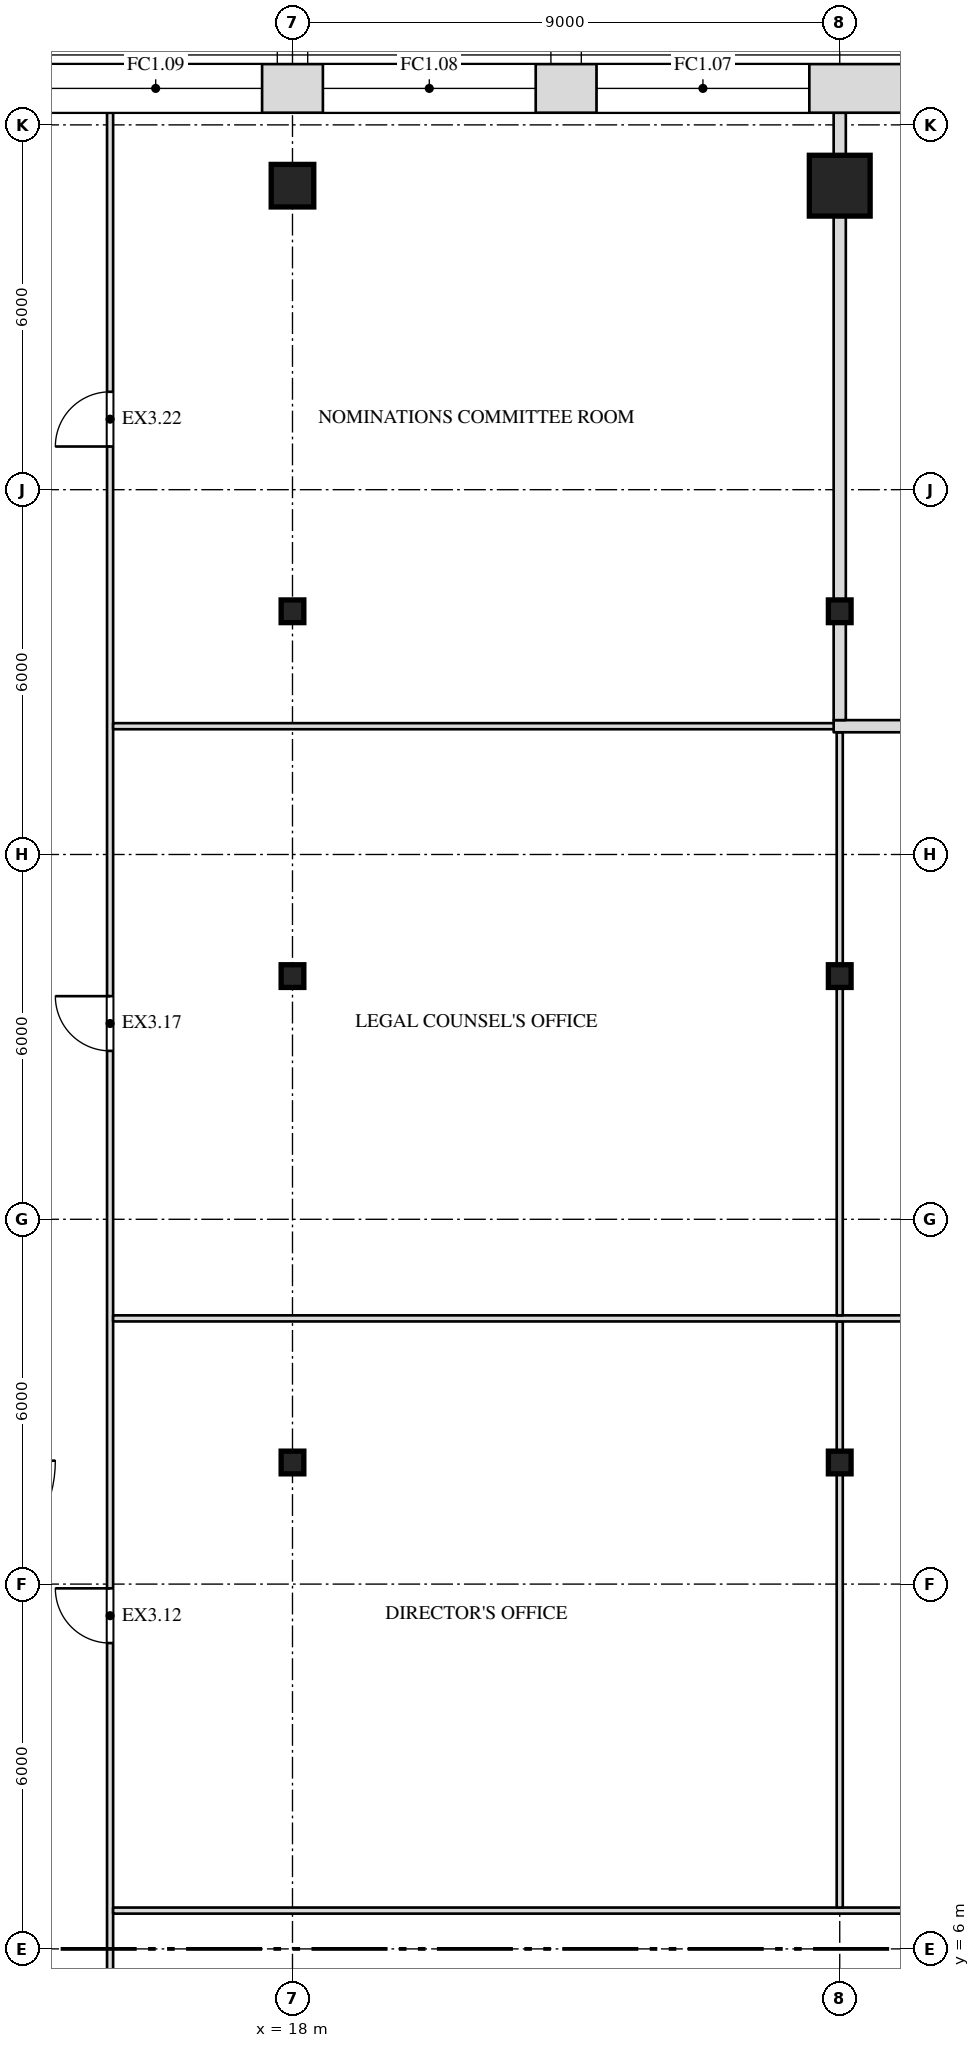
"""IFC4 building model, lengths in metres.
Left out: names, types, materials, properties, quantities, classifications, styles, units other than length and angle.
Written with IfcOpenShell. Run it as: python <this file> out.ifc"""

import sys

from ifc_helpers import new_model, si_unit, direction, frame, frame_2d, origin, origin_2d, place, context, subcontext, project, spatial, rectangle, i_section, extrude, element, fill, save


model = new_model("IFC4")
c1 = context("Model", 3, precision=1e-05, world=origin(), true_north=direction((0.0, 1.0)))
c2 = subcontext(c1, "Body", "Model", "MODEL_VIEW")
j1 = project(units=[si_unit("LENGTHUNIT", "METRE"), si_unit("PLANEANGLEUNIT", "RADIAN")], contexts=[c1])
p1 = place(None, origin())
s1 = spatial("IfcSite", under=j1, at=p1, CompositionType="ELEMENT")
p2 = place(p1, origin())
s2 = spatial("IfcBuilding", under=s1, at=p2, CompositionType="ELEMENT")
p3 = place(p2, frame((0.0, 0.0, 280.5)))
s3 = spatial("IfcBuildingStorey", under=s2, at=p3, CompositionType="ELEMENT", Elevation=280.5)
for number, where, z_axis, x_axis in (
    (1, (18.0, 14.0, 0.0), (0.0, 0.0, 1.0), (1.0, 0.0, 0.0)),
    (2, (27.0, 14.0, 0.0), (0.0, 0.0, 1.0), (1.0, 0.0, 0.0)),
    (3, (18.0, 22.0, 0.0), (0.0, 0.0, 1.0), (1.0, 0.0, 0.0)),
    (4, (27.0, 22.0, 0.0), (0.0, 0.0, 1.0), (1.0, 0.0, 0.0)),
    (5, (18.0, 28.0, 0.0), (0.0, 0.0, 1.0), (1.0, 0.0, 0.0)),
    (6, (27.0, 28.0, 0.0), (0.0, 0.0, 1.0), (1.0, 0.0, 0.0)),
):
    element("IfcColumn", number, at=place(p3, frame(where, z_axis=z_axis, x_axis=x_axis)), inside=s3, PredefinedType="COLUMN", context=c2, shape_type="SweptSolid", body=[
        extrude(i_section(OverallWidth=0.373, OverallDepth=0.373, WebThickness=0.016, FlangeThickness=0.026, at=origin_2d()), origin(), (0.0, 0.0, 1.0), 4.0),
    ])
p4 = place(p3, frame((18.0, 35.0, 0.0), z_axis=(0.0, 0.0, 1.0), x_axis=(1.0, 0.0, 0.0)))
e7 = element("IfcColumn", 7, at=p4, inside=s3, PredefinedType="COLUMN", context=c2, shape_type="SweptSolid", body=[
    extrude(rectangle(XDim=0.7, YDim=0.7, at=origin_2d()), origin(), (0.0, 0.0, 1.0), 4.0),
])
p5 = place(p3, frame((27.0, 35.0, 0.0), z_axis=(0.0, 0.0, 1.0), x_axis=(1.0, 0.0, 0.0)))
e8 = element("IfcColumn", 8, at=p5, inside=s3, PredefinedType="COLUMN", context=c2, shape_type="SweptSolid", body=[
    extrude(rectangle(XDim=1.0, YDim=1.0, at=origin_2d()), origin(), (0.0, 0.0, 1.0), 4.0),
])
p6 = place(p3, frame((15.0, -2.0, 0.0), z_axis=(0.0, 0.0, 1.0), x_axis=(0.0, 1.0, 0.0)))
e9 = element("IfcWall", 9, at=p6, inside=s3, PredefinedType="PARTITIONING", context=c2, shape_type="SweptSolid", body=[
    extrude(rectangle(XDim=38.2, YDim=0.1, at=frame_2d((19.1, 0.0))), origin(), (0.0, 0.0, 1.0), 3.78),
])
p7 = place(p6, frame((13.03, 0.0, 0.0)))
e10 = element("IfcOpeningElement", 10, at=p7, cuts=e9, PredefinedType="OPENING", context=c2, shape_type="SweptSolid", body=[
    extrude(rectangle(XDim=0.9, YDim=2.1, at=frame_2d((0.45, 1.05))), frame((0.0, 0.062, 0.0), z_axis=(0.0, -1.0, 0.0), x_axis=(1.0, 0.0, 0.0)), (0.0, 0.0, 1.0), 0.124),
])
p8 = place(p6, frame((22.77, 0.0, 0.0)))
e11 = element("IfcOpeningElement", 11, at=p8, cuts=e9, PredefinedType="OPENING", context=c2, shape_type="SweptSolid", body=[
    extrude(rectangle(XDim=0.9, YDim=2.1, at=frame_2d((0.45, 1.05))), frame((0.0, 0.062, 0.0), z_axis=(0.0, -1.0, 0.0), x_axis=(1.0, 0.0, 0.0)), (0.0, 0.0, 1.0), 0.124),
])
p9 = place(p6, frame((32.71, 0.0, 0.0)))
e12 = element("IfcOpeningElement", 12, at=p9, cuts=e9, PredefinedType="OPENING", context=c2, shape_type="SweptSolid", body=[
    extrude(rectangle(XDim=0.9, YDim=2.1, at=frame_2d((0.45, 1.05))), frame((0.0, 0.062, 0.0), z_axis=(0.0, -1.0, 0.0), x_axis=(1.0, 0.0, 0.0)), (0.0, 0.0, 1.0), 0.124),
])
p10 = place(p3, frame((15.05, 6.63, 0.0), z_axis=(0.0, 0.0, 1.0), x_axis=(1.0, 0.0, 0.0)))
e13 = element("IfcWall", 13, at=p10, inside=s3, PredefinedType="PARTITIONING", context=c2, shape_type="SweptSolid", body=[
    extrude(rectangle(XDim=20.15, YDim=0.1, at=frame_2d((10.075, 0.0))), origin(), (0.0, 0.0, 1.0), 3.78),
])
p11 = place(p10, frame((15.6, 0.0, 0.0)))
e14 = element("IfcOpeningElement", 14, at=p11, cuts=e13, PredefinedType="OPENING", context=c2, shape_type="SweptSolid", body=[
    extrude(rectangle(XDim=0.9, YDim=2.1, at=frame_2d((0.45, 1.05))), frame((0.0, 0.062, 0.0), z_axis=(0.0, -1.0, 0.0), x_axis=(1.0, 0.0, 0.0)), (0.0, 0.0, 1.0), 0.124),
])
p12 = place(p3, frame((27.0, 6.68, 0.0), z_axis=(0.0, 0.0, 1.0), x_axis=(0.0, 1.0, 0.0)))
e15 = element("IfcWall", 15, at=p12, inside=s3, PredefinedType="PARTITIONING", context=c2, shape_type="SweptSolid", body=[
    extrude(rectangle(XDim=7.133, YDim=0.1, at=frame_2d((3.567, 0.0))), origin(), (0.0, 0.0, 1.0), 2.848),
])
p13 = place(p3, frame((27.0, 14.187, 0.0), z_axis=(0.0, 0.0, 1.0), x_axis=(0.0, 1.0, 0.0)))
e16 = element("IfcWall", 16, at=p13, inside=s3, PredefinedType="PARTITIONING", context=c2, shape_type="SweptSolid", body=[
    extrude(rectangle(XDim=2.133, YDim=0.1, at=frame_2d((1.067, 0.0))), origin(), (0.0, 0.0, 1.0), 2.848),
])
p14 = place(p3, frame((15.05, 16.37, 0.0), z_axis=(0.0, 0.0, 1.0), x_axis=(1.0, 0.0, 0.0)))
e17 = element("IfcWall", 17, at=p14, inside=s3, PredefinedType="PARTITIONING", context=c2, shape_type="SweptSolid", body=[
    extrude(rectangle(XDim=20.15, YDim=0.1, at=frame_2d((10.075, 0.0))), origin(), (0.0, 0.0, 1.0), 3.78),
])
p15 = place(p14, frame((15.6, 0.0, 0.0)))
e18 = element("IfcOpeningElement", 18, at=p15, cuts=e17, PredefinedType="OPENING", context=c2, shape_type="SweptSolid", body=[
    extrude(rectangle(XDim=0.9, YDim=2.1, at=frame_2d((0.45, 1.05))), frame((0.0, 0.062, 0.0), z_axis=(0.0, -1.0, 0.0), x_axis=(1.0, 0.0, 0.0)), (0.0, 0.0, 1.0), 0.124),
])
p16 = place(p3, frame((27.0, 16.42, 0.0), z_axis=(0.0, 0.0, 1.0), x_axis=(0.0, 1.0, 0.0)))
e19 = element("IfcWall", 19, at=p16, inside=s3, PredefinedType="PARTITIONING", context=c2, shape_type="SweptSolid", body=[
    extrude(rectangle(XDim=5.393, YDim=0.1, at=frame_2d((2.697, 0.0))), origin(), (0.0, 0.0, 1.0), 2.848),
])
p17 = place(p3, frame((27.0, 22.187, 0.0), z_axis=(0.0, 0.0, 1.0), x_axis=(0.0, 1.0, 0.0)))
e20 = element("IfcWall", 20, at=p17, inside=s3, PredefinedType="PARTITIONING", context=c2, shape_type="SweptSolid", body=[
    extrude(rectangle(XDim=3.823, YDim=0.1, at=frame_2d((1.912, 0.0))), origin(), (0.0, 0.0, 1.0), 2.848),
])
p18 = place(p3, frame((15.05, 26.11, 0.0), z_axis=(0.0, 0.0, 1.0), x_axis=(1.0, 0.0, 0.0)))
e21 = element("IfcWall", 21, at=p18, inside=s3, PredefinedType="PARTITIONING", context=c2, shape_type="SweptSolid", body=[
    extrude(rectangle(XDim=12.05, YDim=0.1, at=frame_2d((6.025, 0.0))), origin(), (0.0, 0.0, 1.0), 3.78),
])
p19 = place(p3, frame((26.9, 26.11, 0.0), z_axis=(0.0, 0.0, 1.0), x_axis=(1.0, 0.0, 0.0)))
e22 = element("IfcWall", 22, at=p19, inside=s3, PredefinedType="PARTITIONING", context=c2, shape_type="SweptSolid", body=[
    extrude(rectangle(XDim=8.3, YDim=0.2, at=frame_2d((4.15, 0.0))), origin(), (0.0, 0.0, 1.0), 3.78),
])
p20 = place(p19, frame((3.75, 0.0, 0.0)))
e23 = element("IfcOpeningElement", 23, at=p20, cuts=e22, PredefinedType="OPENING", context=c2, shape_type="SweptSolid", body=[
    extrude(rectangle(XDim=0.9, YDim=2.1, at=frame_2d((0.45, 1.05))), frame((0.0, 0.112, 0.0), z_axis=(0.0, -1.0, 0.0), x_axis=(1.0, 0.0, 0.0)), (0.0, 0.0, 1.0), 0.224),
])
p21 = place(p3, frame((27.0, 26.21, 0.0), z_axis=(0.0, 0.0, 1.0), x_axis=(0.0, 1.0, 0.0)))
e24 = element("IfcWall", 24, at=p21, inside=s3, PredefinedType="PARTITIONING", context=c2, shape_type="SweptSolid", body=[
    extrude(rectangle(XDim=1.603, YDim=0.2, at=frame_2d((0.802, 0.0))), origin(), (0.0, 0.0, 1.0), 2.848),
])
p22 = place(p3, frame((27.0, 28.187, 0.0), z_axis=(0.0, 0.0, 1.0), x_axis=(0.0, 1.0, 0.0)))
e25 = element("IfcWall", 25, at=p22, inside=s3, PredefinedType="PARTITIONING", context=c2, shape_type="SweptSolid", body=[
    extrude(rectangle(XDim=6.313, YDim=0.2, at=frame_2d((3.157, 0.0))), origin(), (0.0, 0.0, 1.0), 2.848),
])
p23 = place(p3, frame((27.0, 35.5, 0.0), z_axis=(0.0, 0.0, 1.0), x_axis=(0.0, 1.0, 0.0)))
e26 = element("IfcWall", 26, at=p23, inside=s3, PredefinedType="PARTITIONING", context=c2, shape_type="SweptSolid", body=[
    extrude(rectangle(XDim=0.7, YDim=0.2, at=frame_2d((0.35, 0.0))), origin(), (0.0, 0.0, 1.0), 3.78),
])
p24 = place(p3, frame((29.948, 36.6, 0.0), z_axis=(0.0, 0.0, 1.0), x_axis=(-1.0, 0.0, 0.0)))
e27 = element("IfcWall", 27, at=p24, inside=s3, PredefinedType="SOLIDWALL", context=c2, shape_type="SweptSolid", body=[
    extrude(rectangle(XDim=59.895, YDim=0.8, at=frame_2d((29.948, 0.0))), origin(), (0.0, 0.0, 1.0), 3.78),
])
p25 = place(p24, frame((3.448, 0.0, 1.0)))
e28 = element("IfcOpeningElement", 28, at=p25, cuts=e27, PredefinedType="OPENING", context=c2, shape_type="SweptSolid", body=[
    extrude(rectangle(XDim=3.5, YDim=2.5, at=frame_2d((1.75, 1.25))), frame((0.0, 0.412, 0.0), z_axis=(0.0, -1.0, 0.0), x_axis=(1.0, 0.0, 0.0)), (0.0, 0.0, 1.0), 0.824),
])
p26 = place(p24, frame((7.948, 0.0, 1.0)))
e29 = element("IfcOpeningElement", 29, at=p26, cuts=e27, PredefinedType="OPENING", context=c2, shape_type="SweptSolid", body=[
    extrude(rectangle(XDim=3.5, YDim=2.5, at=frame_2d((1.75, 1.25))), frame((0.0, 0.412, 0.0), z_axis=(0.0, -1.0, 0.0), x_axis=(1.0, 0.0, 0.0)), (0.0, 0.0, 1.0), 0.824),
])
p27 = place(p24, frame((12.448, 0.0, 1.0)))
e30 = element("IfcOpeningElement", 30, at=p27, cuts=e27, PredefinedType="OPENING", context=c2, shape_type="SweptSolid", body=[
    extrude(rectangle(XDim=3.5, YDim=2.5, at=frame_2d((1.75, 1.25))), frame((0.0, 0.412, 0.0), z_axis=(0.0, -1.0, 0.0), x_axis=(1.0, 0.0, 0.0)), (0.0, 0.0, 1.0), 0.824),
])
p28 = place(p24, frame((16.948, 0.0, 1.0)))
e31 = element("IfcOpeningElement", 31, at=p28, cuts=e27, PredefinedType="OPENING", context=c2, shape_type="SweptSolid", body=[
    extrude(rectangle(XDim=3.5, YDim=2.5, at=frame_2d((1.75, 1.25))), frame((0.0, 0.412, 0.0), z_axis=(0.0, -1.0, 0.0), x_axis=(1.0, 0.0, 0.0)), (0.0, 0.0, 1.0), 0.824),
])
p29 = place(p24, frame((21.448, 0.0, 1.0)))
e32 = element("IfcOpeningElement", 32, at=p29, cuts=e27, PredefinedType="OPENING", context=c2, shape_type="SweptSolid", body=[
    extrude(rectangle(XDim=3.5, YDim=2.5, at=frame_2d((1.75, 1.25))), frame((0.0, 0.412, 0.0), z_axis=(0.0, -1.0, 0.0), x_axis=(1.0, 0.0, 0.0)), (0.0, 0.0, 1.0), 0.824),
])
p30 = place(p24, frame((25.948, 0.0, 1.0)))
e33 = element("IfcOpeningElement", 33, at=p30, cuts=e27, PredefinedType="OPENING", context=c2, shape_type="SweptSolid", body=[
    extrude(rectangle(XDim=3.5, YDim=2.5, at=frame_2d((1.75, 1.25))), frame((0.0, 0.412, 0.0), z_axis=(0.0, -1.0, 0.0), x_axis=(1.0, 0.0, 0.0)), (0.0, 0.0, 1.0), 0.824),
])
p31 = place(p24, frame((30.448, 0.0, 1.0)))
e34 = element("IfcOpeningElement", 34, at=p31, cuts=e27, PredefinedType="OPENING", context=c2, shape_type="SweptSolid", body=[
    extrude(rectangle(XDim=3.5, YDim=2.5, at=frame_2d((1.75, 1.25))), frame((0.0, 0.412, 0.0), z_axis=(0.0, -1.0, 0.0), x_axis=(1.0, 0.0, 0.0)), (0.0, 0.0, 1.0), 0.824),
])
p32 = place(p24, frame((34.948, 0.0, 1.0)))
e35 = element("IfcOpeningElement", 35, at=p32, cuts=e27, PredefinedType="OPENING", context=c2, shape_type="SweptSolid", body=[
    extrude(rectangle(XDim=3.5, YDim=2.5, at=frame_2d((1.75, 1.25))), frame((0.0, 0.412, 0.0), z_axis=(0.0, -1.0, 0.0), x_axis=(1.0, 0.0, 0.0)), (0.0, 0.0, 1.0), 0.824),
])
p33 = place(p24, frame((39.448, 0.0, 1.0)))
e36 = element("IfcOpeningElement", 36, at=p33, cuts=e27, PredefinedType="OPENING", context=c2, shape_type="SweptSolid", body=[
    extrude(rectangle(XDim=3.5, YDim=2.5, at=frame_2d((1.75, 1.25))), frame((0.0, 0.412, 0.0), z_axis=(0.0, -1.0, 0.0), x_axis=(1.0, 0.0, 0.0)), (0.0, 0.0, 1.0), 0.824),
])
p34 = place(p24, frame((43.948, 0.0, 1.0)))
e37 = element("IfcOpeningElement", 37, at=p34, cuts=e27, PredefinedType="OPENING", context=c2, shape_type="SweptSolid", body=[
    extrude(rectangle(XDim=3.5, YDim=2.5, at=frame_2d((1.75, 1.25))), frame((0.0, 0.412, 0.0), z_axis=(0.0, -1.0, 0.0), x_axis=(1.0, 0.0, 0.0)), (0.0, 0.0, 1.0), 0.824),
])
p35 = place(p24, frame((48.448, 0.0, 1.0)))
e38 = element("IfcOpeningElement", 38, at=p35, cuts=e27, PredefinedType="OPENING", context=c2, shape_type="SweptSolid", body=[
    extrude(rectangle(XDim=3.5, YDim=2.5, at=frame_2d((1.75, 1.25))), frame((0.0, 0.412, 0.0), z_axis=(0.0, -1.0, 0.0), x_axis=(1.0, 0.0, 0.0)), (0.0, 0.0, 1.0), 0.824),
])
p36 = place(p24, frame((52.948, 0.0, 1.0)))
e39 = element("IfcOpeningElement", 39, at=p36, cuts=e27, PredefinedType="OPENING", context=c2, shape_type="SweptSolid", body=[
    extrude(rectangle(XDim=3.5, YDim=2.5, at=frame_2d((1.75, 1.25))), frame((0.0, 0.412, 0.0), z_axis=(0.0, -1.0, 0.0), x_axis=(1.0, 0.0, 0.0)), (0.0, 0.0, 1.0), 0.824),
])
p37 = place(p7, origin())
e40 = element("IfcDoor", 40, at=p37, inside=s3, OperationType="SINGLE_SWING_RIGHT", PredefinedType="DOOR", context=c2, shape_type="SweptSolid", body=[
    extrude(rectangle(XDim=0.9, YDim=2.1, at=frame_2d((0.45, 1.05))), frame((0.0, 0.025, 0.0), z_axis=(0.0, -1.0, 0.0), x_axis=(1.0, 0.0, 0.0)), (0.0, 0.0, 1.0), 0.05),
])
fill(e10, e40)
p38 = place(p8, origin())
e41 = element("IfcDoor", 41, at=p38, inside=s3, OperationType="SINGLE_SWING_RIGHT", PredefinedType="DOOR", context=c2, shape_type="SweptSolid", body=[
    extrude(rectangle(XDim=0.9, YDim=2.1, at=frame_2d((0.45, 1.05))), frame((0.0, 0.025, 0.0), z_axis=(0.0, -1.0, 0.0), x_axis=(1.0, 0.0, 0.0)), (0.0, 0.0, 1.0), 0.05),
])
fill(e11, e41)
p39 = place(p9, origin())
e42 = element("IfcDoor", 42, at=p39, inside=s3, OperationType="SINGLE_SWING_LEFT", PredefinedType="DOOR", context=c2, shape_type="SweptSolid", body=[
    extrude(rectangle(XDim=0.9, YDim=2.1, at=frame_2d((0.45, 1.05))), frame((0.0, 0.025, 0.0), z_axis=(0.0, -1.0, 0.0), x_axis=(1.0, 0.0, 0.0)), (0.0, 0.0, 1.0), 0.05),
])
fill(e12, e42)
p40 = place(p25, origin())
e43 = element("IfcWindow", 43, at=p40, inside=s3, PartitioningType="SINGLE_PANEL", PredefinedType="WINDOW", context=c2, shape_type="SweptSolid", body=[
    extrude(rectangle(XDim=3.5, YDim=2.5, at=frame_2d((1.75, 1.25))), frame((0.0, 0.03, 0.0), z_axis=(0.0, -1.0, 0.0), x_axis=(1.0, 0.0, 0.0)), (0.0, 0.0, 1.0), 0.06),
])
fill(e28, e43)
p41 = place(p26, origin())
e44 = element("IfcWindow", 44, at=p41, inside=s3, PartitioningType="SINGLE_PANEL", PredefinedType="WINDOW", context=c2, shape_type="SweptSolid", body=[
    extrude(rectangle(XDim=3.5, YDim=2.5, at=frame_2d((1.75, 1.25))), frame((0.0, 0.03, 0.0), z_axis=(0.0, -1.0, 0.0), x_axis=(1.0, 0.0, 0.0)), (0.0, 0.0, 1.0), 0.06),
])
fill(e29, e44)
p42 = place(p27, origin())
e45 = element("IfcWindow", 45, at=p42, inside=s3, PartitioningType="SINGLE_PANEL", PredefinedType="WINDOW", context=c2, shape_type="SweptSolid", body=[
    extrude(rectangle(XDim=3.5, YDim=2.5, at=frame_2d((1.75, 1.25))), frame((0.0, 0.03, 0.0), z_axis=(0.0, -1.0, 0.0), x_axis=(1.0, 0.0, 0.0)), (0.0, 0.0, 1.0), 0.06),
])
fill(e30, e45)
save(model, sys.argv[1])
